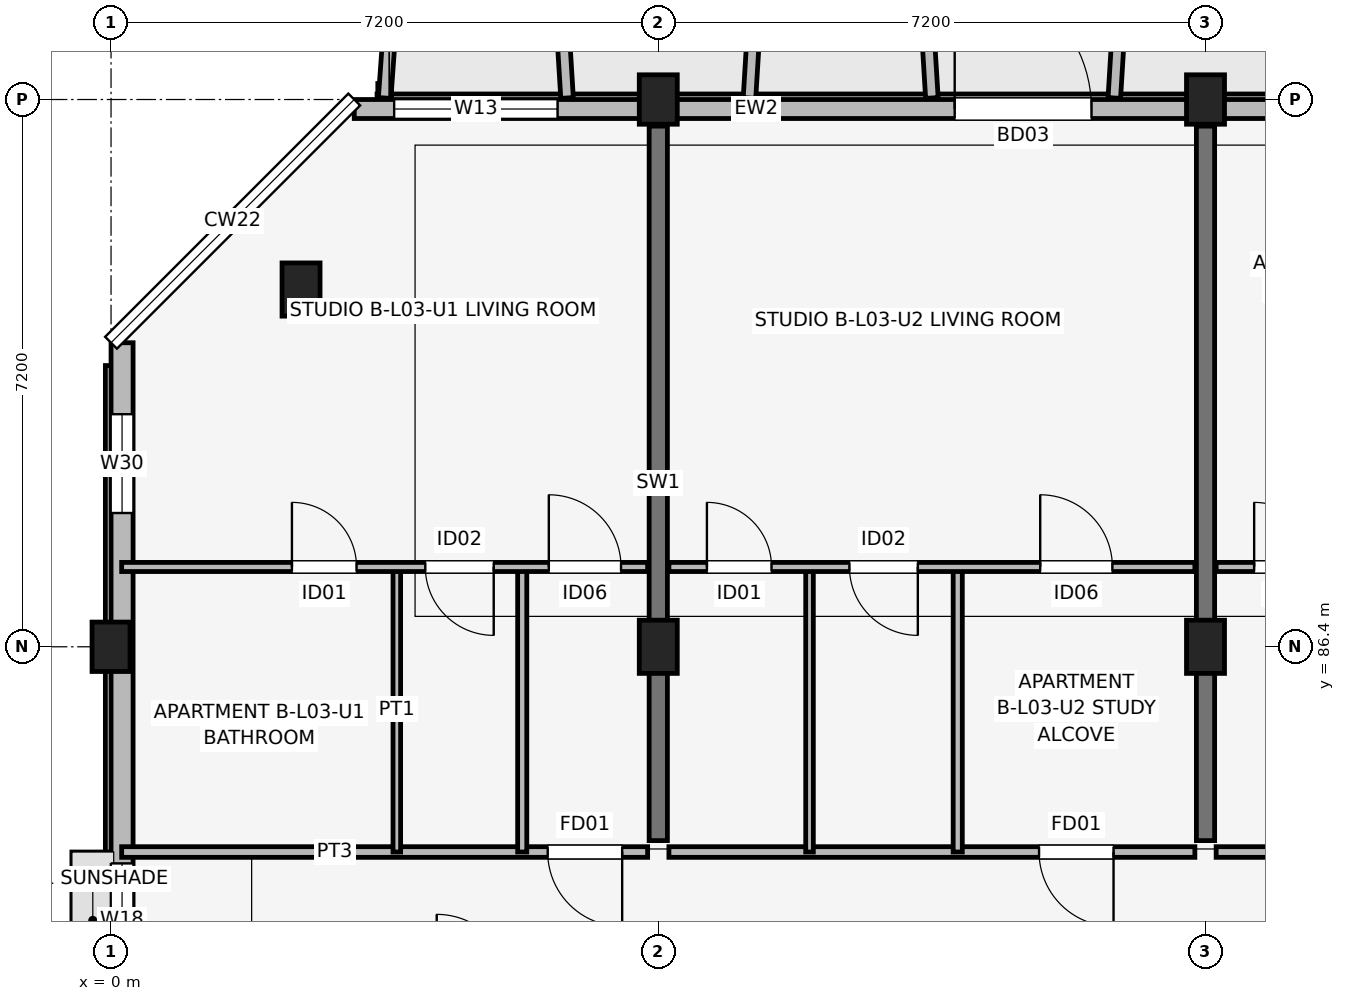
"""IFC4 building model, lengths in metres.
Left out: names, types, materials, properties, quantities, classifications, styles, units other than length and angle.
Written with IfcOpenShell. Run it as: python <this file> out.ifc"""

import sys

from ifc_helpers import new_model, si_unit, direction, frame, frame_2d, origin, origin_2d, place, context, subcontext, project, spatial, rectangle, extrude, element, fill, save


model = new_model("IFC4")
c1 = context("Model", 3, precision=1e-05, world=origin(), true_north=direction((0.0, 1.0)))
c2 = subcontext(c1, "Body", "Model", "MODEL_VIEW")
j1 = project(units=[si_unit("LENGTHUNIT", "METRE"), si_unit("PLANEANGLEUNIT", "RADIAN")], contexts=[c1])
p1 = place(None, origin())
s1 = spatial("IfcSite", under=j1, at=p1, CompositionType="ELEMENT")
p2 = place(p1, origin())
s2 = spatial("IfcBuilding", under=s1, at=p2, CompositionType="ELEMENT")
p3 = place(p2, frame((0.0, 0.0, 11.85)))
s3 = spatial("IfcBuildingStorey", under=s2, at=p3, CompositionType="ELEMENT", Elevation=11.85)
p4 = place(p3, frame((0.0, 86.4, 0.0), z_axis=(0.0, 0.0, 1.0), x_axis=(1.0, 0.0, 0.0)))
e1 = element("IfcColumn", 1, at=p4, inside=s3, PredefinedType="COLUMN", context=c2, shape_type="SweptSolid", body=[
    extrude(rectangle(XDim=0.5, YDim=0.65, at=origin_2d()), origin(), (0.0, 0.0, 1.0), 3.15),
])
for number, where, z_axis, x_axis in (
    (2, (2.5, 91.1, 0.0), (0.0, 0.0, 1.0), (1.0, 0.0, 0.0)),
    (3, (7.2, 86.4, 0.0), (0.0, 0.0, 1.0), (1.0, 0.0, 0.0)),
):
    element("IfcColumn", number, at=place(p3, frame(where, z_axis=z_axis, x_axis=x_axis)), inside=s3, PredefinedType="COLUMN", context=c2, shape_type="SweptSolid", body=[
        extrude(rectangle(XDim=0.5, YDim=0.7, at=origin_2d()), origin(), (0.0, 0.0, 1.0), 3.15),
    ])
p5 = place(p3, frame((7.2, 93.6, 0.0), z_axis=(0.0, 0.0, 1.0), x_axis=(1.0, 0.0, 0.0)))
e4 = element("IfcColumn", 4, at=p5, inside=s3, PredefinedType="COLUMN", context=c2, shape_type="SweptSolid", body=[
    extrude(rectangle(XDim=0.5, YDim=0.65, at=origin_2d()), origin(), (0.0, 0.0, 1.0), 3.15),
])
p6 = place(p3, frame((14.4, 86.4, 0.0), z_axis=(0.0, 0.0, 1.0), x_axis=(1.0, 0.0, 0.0)))
e5 = element("IfcColumn", 5, at=p6, inside=s3, PredefinedType="COLUMN", context=c2, shape_type="SweptSolid", body=[
    extrude(rectangle(XDim=0.5, YDim=0.7, at=origin_2d()), origin(), (0.0, 0.0, 1.0), 3.15),
])
p7 = place(p3, frame((14.4, 93.6, 0.0), z_axis=(0.0, 0.0, 1.0), x_axis=(1.0, 0.0, 0.0)))
e6 = element("IfcColumn", 6, at=p7, inside=s3, PredefinedType="COLUMN", context=c2, shape_type="SweptSolid", body=[
    extrude(rectangle(XDim=0.5, YDim=0.65, at=origin_2d()), origin(), (0.0, 0.0, 1.0), 3.15),
])
for number, where, z_axis, x_axis in (
    (7, (7.2, 83.85, 0.0), (0.0, 0.0, 1.0), (0.0, 1.0, 0.0)),
    (8, (14.4, 83.85, 0.0), (0.0, 0.0, 1.0), (0.0, 1.0, 0.0)),
):
    element("IfcWall", number, at=place(p3, frame(where, z_axis=z_axis, x_axis=x_axis)), inside=s3, PredefinedType="SHEAR", context=c2, shape_type="SweptSolid", body=[
        extrude(rectangle(XDim=9.4, YDim=0.24, at=frame_2d((4.7, 0.0))), origin(), (0.0, 0.0, 1.0), 3.15),
    ])
p8 = place(p3, frame((32.8, 93.475, 0.0), z_axis=(0.0, 0.0, 1.0), x_axis=(-1.0, 0.0, 0.0)))
e9 = element("IfcWall", 9, at=p8, inside=s3, PredefinedType="SOLIDWALL", context=c2, shape_type="SweptSolid", body=[
    extrude(rectangle(XDim=29.6, YDim=0.25, at=frame_2d((14.8, 0.0))), origin(), (0.0, 0.0, 1.0), 2.43),
])
p9 = place(p8, frame((21.7, 0.0, 0.0), z_axis=(0.0, 0.0, 1.0), x_axis=(-1.0, 0.0, 0.0)))
e10 = element("IfcOpeningElement", 10, at=p9, cuts=e9, PredefinedType="OPENING", context=c2, shape_type="SweptSolid", body=[
    extrude(rectangle(XDim=1.8, YDim=2.15, at=frame_2d((0.9, 1.075))), frame((0.0, 0.135, 0.0), z_axis=(0.0, -1.0, 0.0), x_axis=(1.0, 0.0, 0.0)), (0.0, 0.0, 1.0), 0.27),
])
p10 = place(p8, frame((7.225, 0.0, 0.0), z_axis=(0.0, 0.0, 1.0), x_axis=(-1.0, 0.0, 0.0)))
e11 = element("IfcOpeningElement", 11, at=p10, cuts=e9, PredefinedType="OPENING", context=c2, shape_type="SweptSolid", body=[
    extrude(rectangle(XDim=1.65, YDim=2.15, at=frame_2d((0.825, 1.075))), frame((0.0, 0.135, 0.0), z_axis=(0.0, -1.0, 0.0), x_axis=(1.0, 0.0, 0.0)), (0.0, 0.0, 1.0), 0.27),
])
p11 = place(p8, frame((26.925, 0.0, 0.67)))
e12 = element("IfcOpeningElement", 12, at=p11, cuts=e9, PredefinedType="OPENING", context=c2, shape_type="SweptSolid", body=[
    extrude(rectangle(XDim=2.15, YDim=1.65, at=frame_2d((1.075, 0.825))), frame((0.0, 0.135, 0.0), z_axis=(0.0, -1.0, 0.0), x_axis=(1.0, 0.0, 0.0)), (0.0, 0.0, 1.0), 0.27),
])
p12 = place(p8, frame((14.925, 0.0, 0.67)))
e13 = element("IfcOpeningElement", 13, at=p12, cuts=e9, PredefinedType="OPENING", context=c2, shape_type="SweptSolid", body=[
    extrude(rectangle(XDim=2.15, YDim=1.65, at=frame_2d((1.075, 0.825))), frame((0.0, 0.135, 0.0), z_axis=(0.0, -1.0, 0.0), x_axis=(1.0, 0.0, 0.0)), (0.0, 0.0, 1.0), 0.27),
])
p13 = place(p8, frame((12.545, 0.0, 0.75)))
e14 = element("IfcOpeningElement", 14, at=p13, cuts=e9, PredefinedType="OPENING", context=c2, shape_type="SweptSolid", body=[
    extrude(rectangle(XDim=1.46, YDim=1.55, at=frame_2d((0.73, 0.775))), frame((0.0, 0.135, 0.0), z_axis=(0.0, -1.0, 0.0), x_axis=(1.0, 0.0, 0.0)), (0.0, 0.0, 1.0), 0.27),
])
p14 = place(p8, frame((10.155, 0.0, 0.75)))
e15 = element("IfcOpeningElement", 15, at=p14, cuts=e9, PredefinedType="OPENING", context=c2, shape_type="SweptSolid", body=[
    extrude(rectangle(XDim=0.6, YDim=1.25, at=frame_2d((0.3, 0.625))), frame((0.0, 0.135, 0.0), z_axis=(0.0, -1.0, 0.0), x_axis=(1.0, 0.0, 0.0)), (0.0, 0.0, 1.0), 0.27),
])
p15 = place(p8, frame((2.955, 0.0, 0.75)))
e16 = element("IfcOpeningElement", 16, at=p15, cuts=e9, PredefinedType="OPENING", context=c2, shape_type="SweptSolid", body=[
    extrude(rectangle(XDim=0.6, YDim=1.25, at=frame_2d((0.3, 0.625))), frame((0.0, 0.135, 0.0), z_axis=(0.0, -1.0, 0.0), x_axis=(1.0, 0.0, 0.0)), (0.0, 0.0, 1.0), 0.27),
])
p16 = place(p8, frame((0.775, 0.0, 0.75)))
e17 = element("IfcOpeningElement", 17, at=p16, cuts=e9, PredefinedType="OPENING", context=c2, shape_type="SweptSolid", body=[
    extrude(rectangle(XDim=0.85, YDim=1.4, at=frame_2d((0.425, 0.7))), frame((0.0, 0.135, 0.0), z_axis=(0.0, -1.0, 0.0), x_axis=(1.0, 0.0, 0.0)), (0.0, 0.0, 1.0), 0.27),
])
p17 = place(p3, frame((0.145, 90.4, 0.0), z_axis=(0.0, 0.0, 1.0), x_axis=(0.0, -1.0, 0.0)))
e18 = element("IfcWall", 18, at=p17, inside=s3, PredefinedType="SOLIDWALL", context=c2, shape_type="SweptSolid", body=[
    extrude(rectangle(XDim=15.2, YDim=0.29, at=frame_2d((7.6, 0.0))), origin(), (0.0, 0.0, 1.0), 2.38),
])
p18 = place(p17, frame((6.85, 0.0, 1.05)))
e19 = element("IfcOpeningElement", 19, at=p18, cuts=e18, PredefinedType="OPENING", context=c2, shape_type="SweptSolid", body=[
    extrude(rectangle(XDim=1.5, YDim=1.15, at=frame_2d((0.75, 0.575))), frame((0.0, 0.155, 0.0), z_axis=(0.0, -1.0, 0.0), x_axis=(1.0, 0.0, 0.0)), (0.0, 0.0, 1.0), 0.31),
])
p19 = place(p17, frame((0.94, 0.0, 0.72)))
e20 = element("IfcOpeningElement", 20, at=p19, cuts=e18, PredefinedType="OPENING", context=c2, shape_type="SweptSolid", body=[
    extrude(rectangle(XDim=1.3, YDim=1.55, at=frame_2d((0.65, 0.775))), frame((0.0, 0.155, 0.0), z_axis=(0.0, -1.0, 0.0), x_axis=(1.0, 0.0, 0.0)), (0.0, 0.0, 1.0), 0.31),
])
p20 = place(p3, frame((3.6, 93.62, 0.0), z_axis=(0.0, 0.0, 1.0), x_axis=(0.071194071069, 0.997462482625, 0.0)))
e21 = element("IfcWall", 21, at=p20, inside=s3, PredefinedType="ELEMENTEDWALL", context=c2, shape_type="SweptSolid", body=[
    extrude(rectangle(XDim=1.965, YDim=0.165, at=frame_2d((0.982, 0.0))), origin(), (0.0, 0.0, 1.0), 2.95),
])
p21 = place(p3, frame((6.0, 93.62, 0.0), z_axis=(0.0, 0.0, 1.0), x_axis=(-0.061170732449, 0.998127317276, 0.0)))
e22 = element("IfcWall", 22, at=p21, inside=s3, PredefinedType="ELEMENTEDWALL", context=c2, shape_type="SweptSolid", body=[
    extrude(rectangle(XDim=1.964, YDim=0.165, at=frame_2d((0.982, 0.0))), origin(), (0.0, 0.0, 1.0), 2.95),
])
for number, where, z_axis, x_axis in (
    (23, (8.4, 93.62, 0.0), (0.0, 0.0, 1.0), (0.061, 0.998, 0.0)),
    (24, (10.8, 93.62, 0.0), (0.0, 0.0, 1.0), (-0.061, 0.998, 0.0)),
    (25, (13.2, 93.62, 0.0), (0.0, 0.0, 1.0), (0.061, 0.998, 0.0)),
):
    element("IfcWall", number, at=place(p3, frame(where, z_axis=z_axis, x_axis=x_axis)), inside=s3, PredefinedType="ELEMENTEDWALL", context=c2, shape_type="SweptSolid", body=[
        extrude(rectangle(XDim=1.964, YDim=0.165, at=frame_2d((0.982, 0.0))), origin(), (0.0, 0.0, 1.0), 2.58),
    ])
p22 = place(p3, frame((0.14, 83.7, 0.0), z_axis=(0.0, 0.0, 1.0), x_axis=(1.0, 0.0, 0.0)))
e26 = element("IfcWall", 26, at=p22, inside=s3, PredefinedType="PARTITIONING", context=c2, shape_type="SweptSolid", body=[
    extrude(rectangle(XDim=6.92, YDim=0.14, at=frame_2d((3.46, 0.0))), origin(), (0.0, 0.0, 1.0), 2.38),
])
p23 = place(p22, frame((6.585, 0.0, 0.0), z_axis=(0.0, 0.0, 1.0), x_axis=(-1.0, 0.0, 0.0)))
e27 = element("IfcOpeningElement", 27, at=p23, cuts=e26, PredefinedType="OPENING", context=c2, shape_type="SweptSolid", body=[
    extrude(rectangle(XDim=0.98, YDim=2.1, at=frame_2d((0.49, 1.05))), frame((0.0, 0.08, 0.0), z_axis=(0.0, -1.0, 0.0), x_axis=(1.0, 0.0, 0.0)), (0.0, 0.0, 1.0), 0.16),
])
p24 = place(p3, frame((3.76, 83.7, 0.0), z_axis=(0.0, 0.0, 1.0), x_axis=(0.0, 1.0, 0.0)))
e28 = element("IfcWall", 28, at=p24, inside=s3, PredefinedType="PARTITIONING", context=c2, shape_type="SweptSolid", body=[
    extrude(rectangle(XDim=3.75, YDim=0.1, at=frame_2d((1.875, 0.0))), origin(), (0.0, 0.0, 1.0), 2.375),
])
p25 = place(p3, frame((5.41, 83.7, 0.0), z_axis=(0.0, 0.0, 1.0), x_axis=(0.0, 1.0, 0.0)))
e29 = element("IfcWall", 29, at=p25, inside=s3, PredefinedType="PARTITIONING", context=c2, shape_type="SweptSolid", body=[
    extrude(rectangle(XDim=3.75, YDim=0.12, at=frame_2d((1.875, 0.0))), origin(), (0.0, 0.0, 1.0), 2.375),
])
p26 = place(p3, frame((0.14, 87.45, 0.0), z_axis=(0.0, 0.0, 1.0), x_axis=(1.0, 0.0, 0.0)))
e30 = element("IfcWall", 30, at=p26, inside=s3, PredefinedType="PARTITIONING", context=c2, shape_type="SweptSolid", body=[
    extrude(rectangle(XDim=6.92, YDim=0.12, at=frame_2d((3.46, 0.0))), origin(), (0.0, 0.0, 1.0), 2.38),
])
p27 = place(p26, frame((2.24, 0.0, 0.0)))
e31 = element("IfcOpeningElement", 31, at=p27, cuts=e30, PredefinedType="OPENING", context=c2, shape_type="SweptSolid", body=[
    extrude(rectangle(XDim=0.85, YDim=2.08, at=frame_2d((0.425, 1.04))), frame((0.0, 0.07, 0.0), z_axis=(0.0, -1.0, 0.0), x_axis=(1.0, 0.0, 0.0)), (0.0, 0.0, 1.0), 0.14),
])
p28 = place(p26, frame((4.895, 0.0, 0.0), z_axis=(0.0, 0.0, 1.0), x_axis=(-1.0, 0.0, 0.0)))
e32 = element("IfcOpeningElement", 32, at=p28, cuts=e30, PredefinedType="OPENING", context=c2, shape_type="SweptSolid", body=[
    extrude(rectangle(XDim=0.9, YDim=2.08, at=frame_2d((0.45, 1.04))), frame((0.0, 0.07, 0.0), z_axis=(0.0, -1.0, 0.0), x_axis=(1.0, 0.0, 0.0)), (0.0, 0.0, 1.0), 0.14),
])
p29 = place(p26, frame((5.62, 0.0, 0.0)))
e33 = element("IfcOpeningElement", 33, at=p29, cuts=e30, PredefinedType="OPENING", context=c2, shape_type="SweptSolid", body=[
    extrude(rectangle(XDim=0.95, YDim=2.08, at=frame_2d((0.475, 1.04))), frame((0.0, 0.07, 0.0), z_axis=(0.0, -1.0, 0.0), x_axis=(1.0, 0.0, 0.0)), (0.0, 0.0, 1.0), 0.14),
])
p30 = place(p3, frame((7.34, 83.7, 0.0), z_axis=(0.0, 0.0, 1.0), x_axis=(1.0, 0.0, 0.0)))
e34 = element("IfcWall", 34, at=p30, inside=s3, PredefinedType="PARTITIONING", context=c2, shape_type="SweptSolid", body=[
    extrude(rectangle(XDim=6.92, YDim=0.14, at=frame_2d((3.46, 0.0))), origin(), (0.0, 0.0, 1.0), 2.38),
])
p31 = place(p30, frame((5.85, 0.0, 0.0), z_axis=(0.0, 0.0, 1.0), x_axis=(-1.0, 0.0, 0.0)))
e35 = element("IfcOpeningElement", 35, at=p31, cuts=e34, PredefinedType="OPENING", context=c2, shape_type="SweptSolid", body=[
    extrude(rectangle(XDim=0.98, YDim=2.1, at=frame_2d((0.49, 1.05))), frame((0.0, 0.08, 0.0), z_axis=(0.0, -1.0, 0.0), x_axis=(1.0, 0.0, 0.0)), (0.0, 0.0, 1.0), 0.16),
])
p32 = place(p3, frame((9.19, 83.7, 0.0), z_axis=(0.0, 0.0, 1.0), x_axis=(0.0, 1.0, 0.0)))
e36 = element("IfcWall", 36, at=p32, inside=s3, PredefinedType="PARTITIONING", context=c2, shape_type="SweptSolid", body=[
    extrude(rectangle(XDim=3.75, YDim=0.1, at=frame_2d((1.875, 0.0))), origin(), (0.0, 0.0, 1.0), 2.375),
])
p33 = place(p3, frame((11.14, 83.7, 0.0), z_axis=(0.0, 0.0, 1.0), x_axis=(0.0, 1.0, 0.0)))
e37 = element("IfcWall", 37, at=p33, inside=s3, PredefinedType="PARTITIONING", context=c2, shape_type="SweptSolid", body=[
    extrude(rectangle(XDim=3.75, YDim=0.12, at=frame_2d((1.875, 0.0))), origin(), (0.0, 0.0, 1.0), 2.375),
])
p34 = place(p3, frame((7.34, 87.45, 0.0), z_axis=(0.0, 0.0, 1.0), x_axis=(1.0, 0.0, 0.0)))
e38 = element("IfcWall", 38, at=p34, inside=s3, PredefinedType="PARTITIONING", context=c2, shape_type="SweptSolid", body=[
    extrude(rectangle(XDim=6.92, YDim=0.12, at=frame_2d((3.46, 0.0))), origin(), (0.0, 0.0, 1.0), 2.38),
])
p35 = place(p34, frame((0.5, 0.0, 0.0)))
e39 = element("IfcOpeningElement", 39, at=p35, cuts=e38, PredefinedType="OPENING", context=c2, shape_type="SweptSolid", body=[
    extrude(rectangle(XDim=0.85, YDim=2.08, at=frame_2d((0.425, 1.04))), frame((0.0, 0.07, 0.0), z_axis=(0.0, -1.0, 0.0), x_axis=(1.0, 0.0, 0.0)), (0.0, 0.0, 1.0), 0.14),
])
p36 = place(p34, frame((3.275, 0.0, 0.0), z_axis=(0.0, 0.0, 1.0), x_axis=(-1.0, 0.0, 0.0)))
e40 = element("IfcOpeningElement", 40, at=p36, cuts=e38, PredefinedType="OPENING", context=c2, shape_type="SweptSolid", body=[
    extrude(rectangle(XDim=0.9, YDim=2.08, at=frame_2d((0.45, 1.04))), frame((0.0, 0.07, 0.0), z_axis=(0.0, -1.0, 0.0), x_axis=(1.0, 0.0, 0.0)), (0.0, 0.0, 1.0), 0.14),
])
p37 = place(p34, frame((4.885, 0.0, 0.0)))
e41 = element("IfcOpeningElement", 41, at=p37, cuts=e38, PredefinedType="OPENING", context=c2, shape_type="SweptSolid", body=[
    extrude(rectangle(XDim=0.95, YDim=2.08, at=frame_2d((0.475, 1.04))), frame((0.0, 0.07, 0.0), z_axis=(0.0, -1.0, 0.0), x_axis=(1.0, 0.0, 0.0)), (0.0, 0.0, 1.0), 0.14),
])
p38 = place(p3, frame((14.54, 83.7, 0.0), z_axis=(0.0, 0.0, 1.0), x_axis=(1.0, 0.0, 0.0)))
e42 = element("IfcWall", 42, at=p38, inside=s3, PredefinedType="PARTITIONING", context=c2, shape_type="SweptSolid", body=[
    extrude(rectangle(XDim=6.92, YDim=0.14, at=frame_2d((3.46, 0.0))), origin(), (0.0, 0.0, 1.0), 2.38),
])
p39 = place(p38, frame((6.0, 0.0, 0.0), z_axis=(0.0, 0.0, 1.0), x_axis=(-1.0, 0.0, 0.0)))
e43 = element("IfcOpeningElement", 43, at=p39, cuts=e42, PredefinedType="OPENING", context=c2, shape_type="SweptSolid", body=[
    extrude(rectangle(XDim=0.98, YDim=2.1, at=frame_2d((0.49, 1.05))), frame((0.0, 0.08, 0.0), z_axis=(0.0, -1.0, 0.0), x_axis=(1.0, 0.0, 0.0)), (0.0, 0.0, 1.0), 0.16),
])
p40 = place(p3, frame((14.54, 87.45, 0.0), z_axis=(0.0, 0.0, 1.0), x_axis=(1.0, 0.0, 0.0)))
e44 = element("IfcWall", 44, at=p40, inside=s3, PredefinedType="PARTITIONING", context=c2, shape_type="SweptSolid", body=[
    extrude(rectangle(XDim=6.92, YDim=0.12, at=frame_2d((3.46, 0.0))), origin(), (0.0, 0.0, 1.0), 2.38),
])
p41 = place(p40, frame((0.5, 0.0, 0.0)))
e45 = element("IfcOpeningElement", 45, at=p41, cuts=e44, PredefinedType="OPENING", context=c2, shape_type="SweptSolid", body=[
    extrude(rectangle(XDim=0.85, YDim=2.08, at=frame_2d((0.425, 1.04))), frame((0.0, 0.07, 0.0), z_axis=(0.0, -1.0, 0.0), x_axis=(1.0, 0.0, 0.0)), (0.0, 0.0, 1.0), 0.14),
])
p42 = place(p40, frame((3.425, 0.0, 0.0), z_axis=(0.0, 0.0, 1.0), x_axis=(-1.0, 0.0, 0.0)))
e46 = element("IfcOpeningElement", 46, at=p42, cuts=e44, PredefinedType="OPENING", context=c2, shape_type="SweptSolid", body=[
    extrude(rectangle(XDim=0.9, YDim=2.08, at=frame_2d((0.45, 1.04))), frame((0.0, 0.07, 0.0), z_axis=(0.0, -1.0, 0.0), x_axis=(1.0, 0.0, 0.0)), (0.0, 0.0, 1.0), 0.14),
])
p43 = place(p40, frame((5.035, 0.0, 0.0)))
e47 = element("IfcOpeningElement", 47, at=p43, cuts=e44, PredefinedType="OPENING", context=c2, shape_type="SweptSolid", body=[
    extrude(rectangle(XDim=0.95, YDim=2.08, at=frame_2d((0.475, 1.04))), frame((0.0, 0.07, 0.0), z_axis=(0.0, -1.0, 0.0), x_axis=(1.0, 0.0, 0.0)), (0.0, 0.0, 1.0), 0.14),
])
p44 = place(p9, origin())
e48 = element("IfcDoor", 48, at=p44, inside=s3, OperationType="SINGLE_SWING_RIGHT", PredefinedType="DOOR", context=c2, shape_type="SweptSolid", body=[
    extrude(rectangle(XDim=1.8, YDim=2.15, at=frame_2d((0.9, 1.075))), frame((0.0, 0.025, 0.0), z_axis=(0.0, -1.0, 0.0), x_axis=(1.0, 0.0, 0.0)), (0.0, 0.0, 1.0), 0.05),
])
fill(e10, e48)
p45 = place(p11, origin())
e49 = element("IfcWindow", 49, at=p45, inside=s3, PartitioningType="SINGLE_PANEL", PredefinedType="WINDOW", context=c2, shape_type="SweptSolid", body=[
    extrude(rectangle(XDim=2.15, YDim=1.65, at=frame_2d((1.075, 0.825))), frame((0.0, 0.03, 0.0), z_axis=(0.0, -1.0, 0.0), x_axis=(1.0, 0.0, 0.0)), (0.0, 0.0, 1.0), 0.06),
])
fill(e12, e49)
p46 = place(p18, origin())
e50 = element("IfcWindow", 50, at=p46, inside=s3, PartitioningType="SINGLE_PANEL", PredefinedType="WINDOW", context=c2, shape_type="SweptSolid", body=[
    extrude(rectangle(XDim=1.5, YDim=1.15, at=frame_2d((0.75, 0.575))), frame((0.0, 0.03, 0.0), z_axis=(0.0, -1.0, 0.0), x_axis=(1.0, 0.0, 0.0)), (0.0, 0.0, 1.0), 0.06),
])
fill(e19, e50)
p47 = place(p19, origin())
e51 = element("IfcWindow", 51, at=p47, inside=s3, PartitioningType="SINGLE_PANEL", PredefinedType="WINDOW", context=c2, shape_type="SweptSolid", body=[
    extrude(rectangle(XDim=1.3, YDim=1.55, at=frame_2d((0.65, 0.775))), frame((0.0, 0.03, 0.0), z_axis=(0.0, -1.0, 0.0), x_axis=(1.0, 0.0, 0.0)), (0.0, 0.0, 1.0), 0.06),
])
fill(e20, e51)
p48 = place(p23, origin())
e52 = element("IfcDoor", 52, at=p48, inside=s3, OperationType="SINGLE_SWING_RIGHT", PredefinedType="DOOR", context=c2, shape_type="SweptSolid", body=[
    extrude(rectangle(XDim=0.98, YDim=2.1, at=frame_2d((0.49, 1.05))), frame((0.0, 0.025, 0.0), z_axis=(0.0, -1.0, 0.0), x_axis=(1.0, 0.0, 0.0)), (0.0, 0.0, 1.0), 0.05),
])
fill(e27, e52)
p49 = place(p27, origin())
e53 = element("IfcDoor", 53, at=p49, inside=s3, OperationType="SINGLE_SWING_LEFT", PredefinedType="DOOR", context=c2, shape_type="SweptSolid", body=[
    extrude(rectangle(XDim=0.85, YDim=2.08, at=frame_2d((0.425, 1.04))), frame((0.0, 0.025, 0.0), z_axis=(0.0, -1.0, 0.0), x_axis=(1.0, 0.0, 0.0)), (0.0, 0.0, 1.0), 0.05),
])
fill(e31, e53)
p50 = place(p28, origin())
e54 = element("IfcDoor", 54, at=p50, inside=s3, OperationType="SINGLE_SWING_RIGHT", PredefinedType="DOOR", context=c2, shape_type="SweptSolid", body=[
    extrude(rectangle(XDim=0.9, YDim=2.08, at=frame_2d((0.45, 1.04))), frame((0.0, 0.025, 0.0), z_axis=(0.0, -1.0, 0.0), x_axis=(1.0, 0.0, 0.0)), (0.0, 0.0, 1.0), 0.05),
])
fill(e32, e54)
p51 = place(p29, origin())
e55 = element("IfcDoor", 55, at=p51, inside=s3, OperationType="SINGLE_SWING_LEFT", PredefinedType="DOOR", context=c2, shape_type="SweptSolid", body=[
    extrude(rectangle(XDim=0.95, YDim=2.08, at=frame_2d((0.475, 1.04))), frame((0.0, 0.025, 0.0), z_axis=(0.0, -1.0, 0.0), x_axis=(1.0, 0.0, 0.0)), (0.0, 0.0, 1.0), 0.05),
])
fill(e33, e55)
p52 = place(p31, origin())
e56 = element("IfcDoor", 56, at=p52, inside=s3, OperationType="SINGLE_SWING_RIGHT", PredefinedType="DOOR", context=c2, shape_type="SweptSolid", body=[
    extrude(rectangle(XDim=0.98, YDim=2.1, at=frame_2d((0.49, 1.05))), frame((0.0, 0.025, 0.0), z_axis=(0.0, -1.0, 0.0), x_axis=(1.0, 0.0, 0.0)), (0.0, 0.0, 1.0), 0.05),
])
fill(e35, e56)
p53 = place(p35, origin())
e57 = element("IfcDoor", 57, at=p53, inside=s3, OperationType="SINGLE_SWING_LEFT", PredefinedType="DOOR", context=c2, shape_type="SweptSolid", body=[
    extrude(rectangle(XDim=0.85, YDim=2.08, at=frame_2d((0.425, 1.04))), frame((0.0, 0.025, 0.0), z_axis=(0.0, -1.0, 0.0), x_axis=(1.0, 0.0, 0.0)), (0.0, 0.0, 1.0), 0.05),
])
fill(e39, e57)
p54 = place(p36, origin())
e58 = element("IfcDoor", 58, at=p54, inside=s3, OperationType="SINGLE_SWING_RIGHT", PredefinedType="DOOR", context=c2, shape_type="SweptSolid", body=[
    extrude(rectangle(XDim=0.9, YDim=2.08, at=frame_2d((0.45, 1.04))), frame((0.0, 0.025, 0.0), z_axis=(0.0, -1.0, 0.0), x_axis=(1.0, 0.0, 0.0)), (0.0, 0.0, 1.0), 0.05),
])
fill(e40, e58)
p55 = place(p37, origin())
e59 = element("IfcDoor", 59, at=p55, inside=s3, OperationType="SINGLE_SWING_LEFT", PredefinedType="DOOR", context=c2, shape_type="SweptSolid", body=[
    extrude(rectangle(XDim=0.95, YDim=2.08, at=frame_2d((0.475, 1.04))), frame((0.0, 0.025, 0.0), z_axis=(0.0, -1.0, 0.0), x_axis=(1.0, 0.0, 0.0)), (0.0, 0.0, 1.0), 0.05),
])
fill(e41, e59)
p56 = place(p41, origin())
e60 = element("IfcDoor", 60, at=p56, inside=s3, OperationType="SINGLE_SWING_LEFT", PredefinedType="DOOR", context=c2, shape_type="SweptSolid", body=[
    extrude(rectangle(XDim=0.85, YDim=2.08, at=frame_2d((0.425, 1.04))), frame((0.0, 0.025, 0.0), z_axis=(0.0, -1.0, 0.0), x_axis=(1.0, 0.0, 0.0)), (0.0, 0.0, 1.0), 0.05),
])
fill(e45, e60)
save(model, sys.argv[1])
